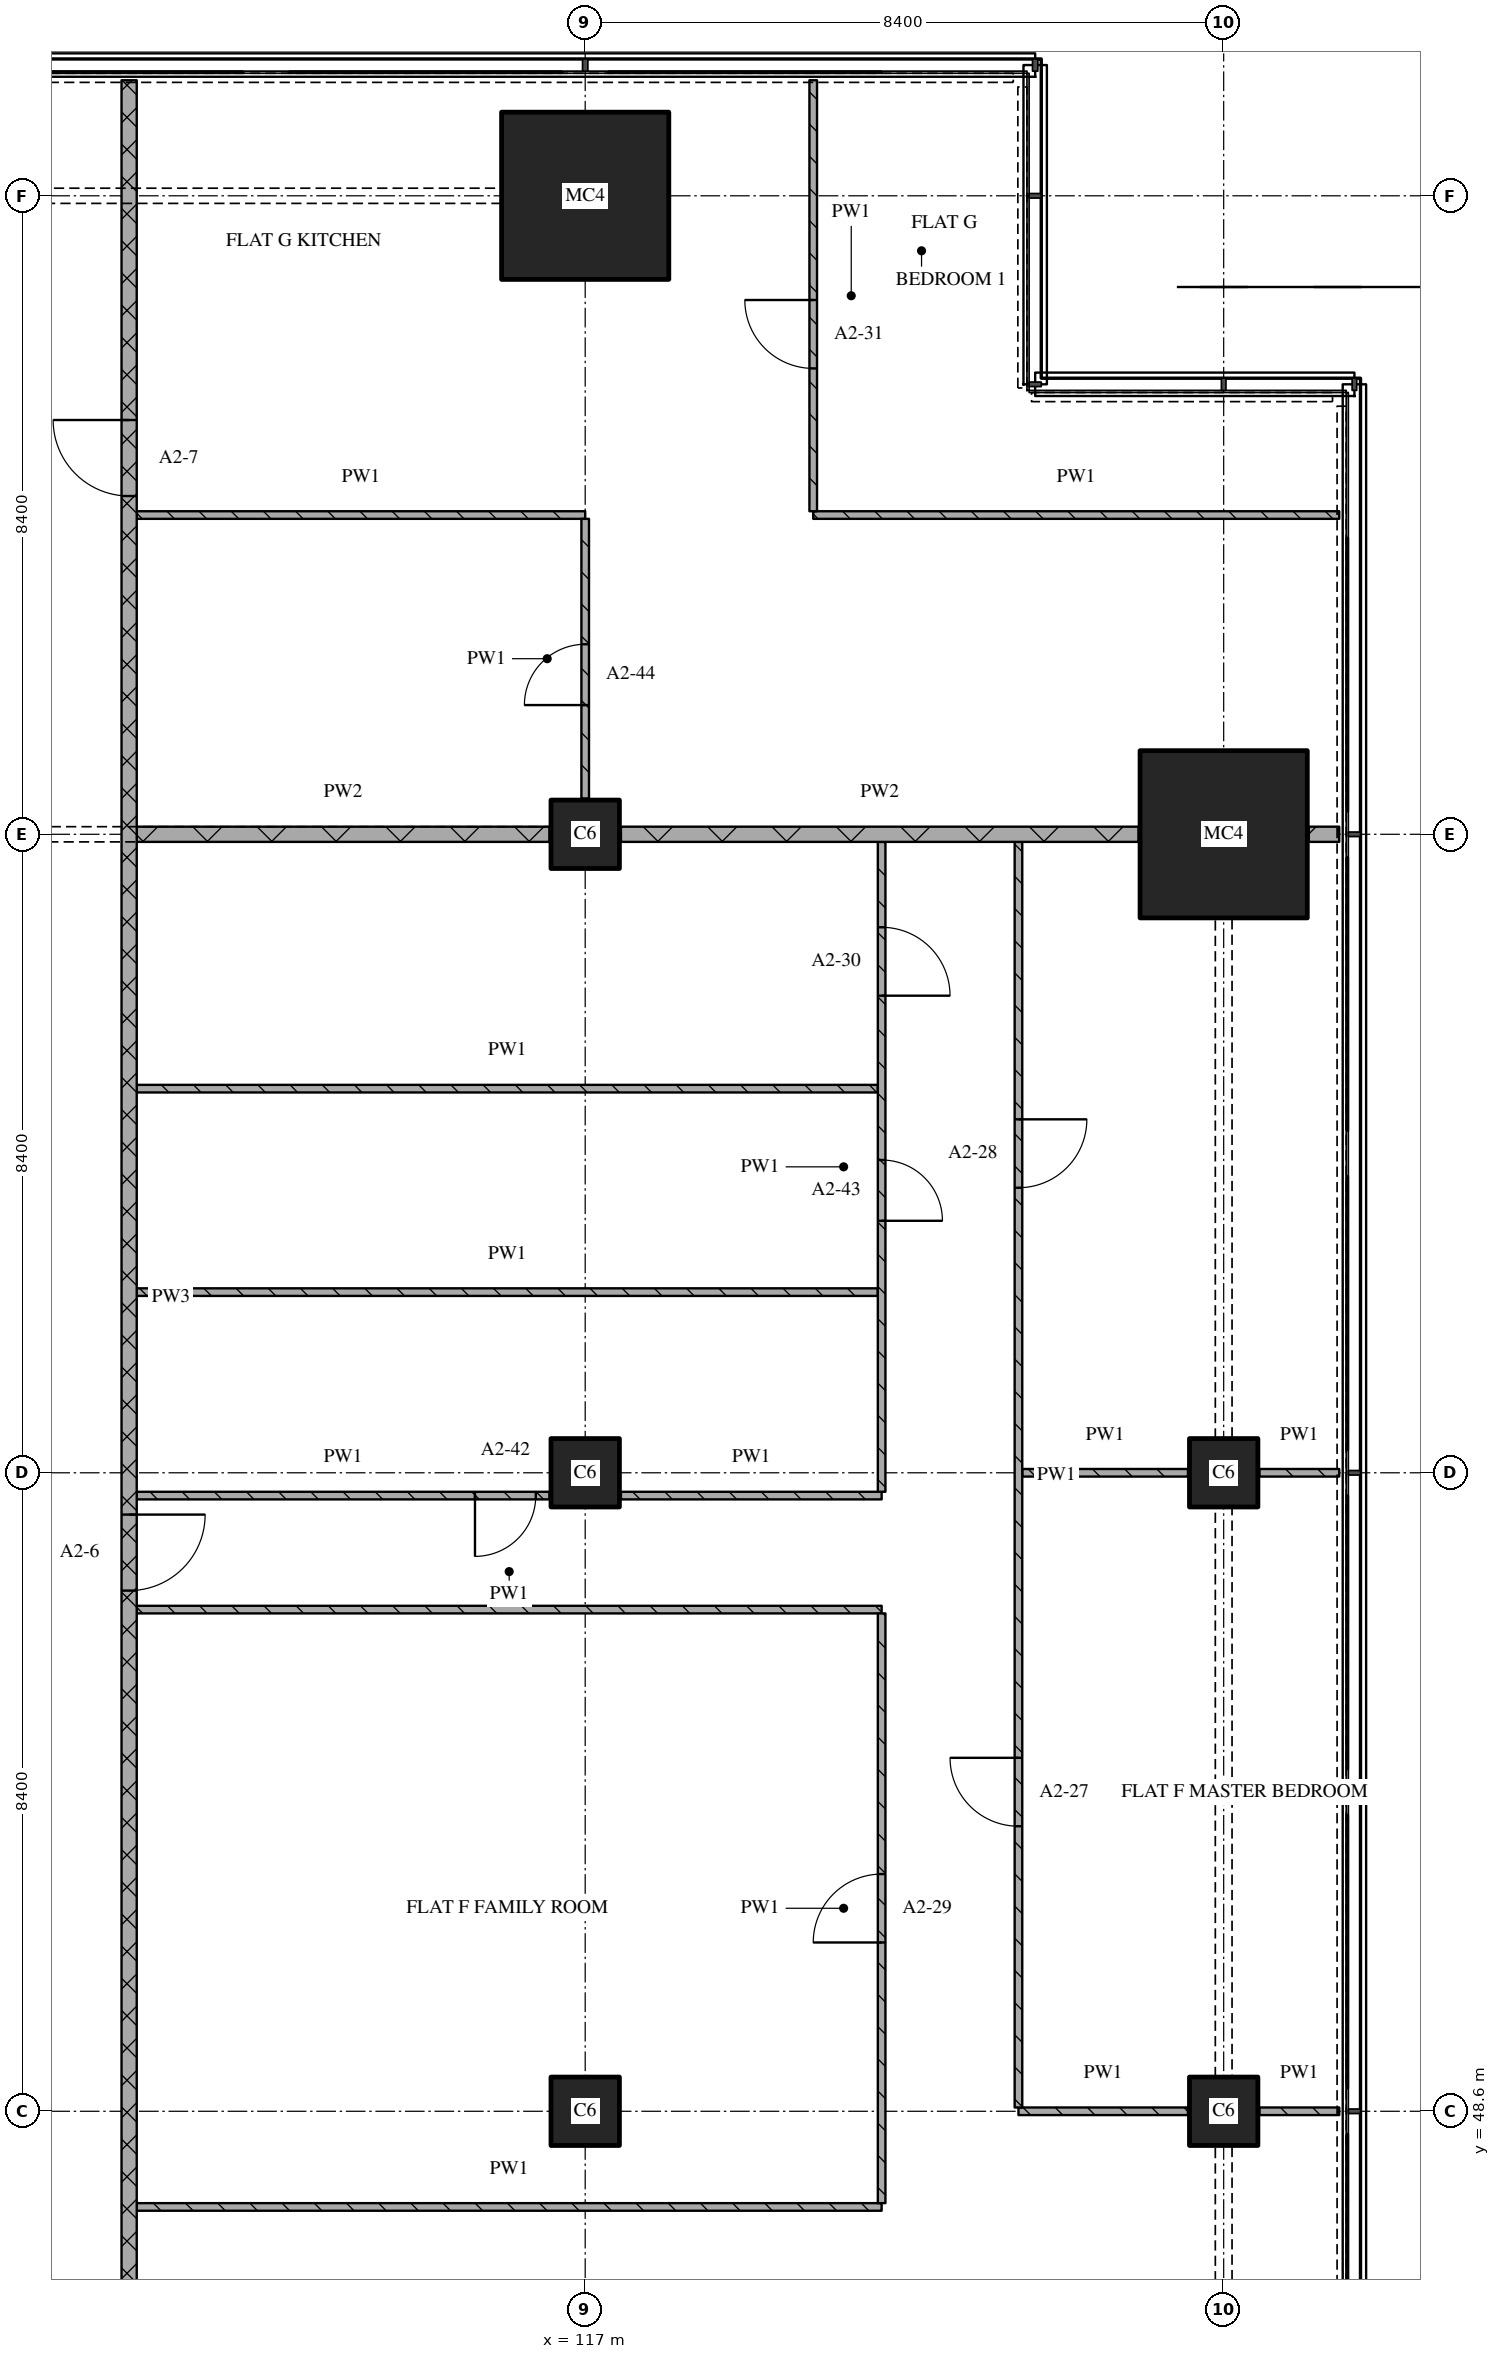
"""IFC4 building model, lengths in metres.
Left out: names, types, materials, properties, quantities, classifications, styles, units other than length and angle.
Written with IfcOpenShell. Run it as: python <this file> out.ifc"""

import sys

from ifc_helpers import new_model, si_unit, direction, frame, frame_2d, origin, origin_2d, place, context, subcontext, project, spatial, rectangle, extrude, element, fill, save


model = new_model("IFC4")
c1 = context("Model", 3, precision=1e-05, world=origin(), true_north=direction((0.0, 1.0)))
c2 = subcontext(c1, "Body", "Model", "MODEL_VIEW")
j1 = project(units=[si_unit("LENGTHUNIT", "METRE"), si_unit("PLANEANGLEUNIT", "RADIAN")], contexts=[c1])
p1 = place(None, origin())
s1 = spatial("IfcSite", under=j1, at=p1, CompositionType="ELEMENT")
p2 = place(p1, origin())
s2 = spatial("IfcBuilding", under=s1, at=p2, CompositionType="ELEMENT")
p3 = place(p2, frame((0.0, 0.0, 55.2)))
s3 = spatial("IfcBuildingStorey", under=s2, at=p3, CompositionType="ELEMENT", Elevation=55.2)
for number, where, z_axis, x_axis in (
    (1, (117.0, 48.6, 0.0), (0.0, 0.0, 1.0), (1.0, 0.0, 0.0)),
    (2, (117.0, 57.0, 0.0), (0.0, 0.0, 1.0), (1.0, 0.0, 0.0)),
    (3, (117.0, 65.4, 0.0), (0.0, 0.0, 1.0), (1.0, 0.0, 0.0)),
):
    element("IfcColumn", number, at=place(p3, frame(where, z_axis=z_axis, x_axis=x_axis)), inside=s3, PredefinedType="COLUMN", context=c2, shape_type="SweptSolid", body=[
        extrude(rectangle(XDim=0.9, YDim=0.9, at=origin_2d()), origin(), (0.0, 0.0, 1.0), 3.6),
    ])
p4 = place(p3, frame((117.0, 73.8, 0.0), z_axis=(0.0, 0.0, 1.0), x_axis=(1.0, 0.0, 0.0)))
e4 = element("IfcColumn", 4, at=p4, inside=s3, PredefinedType="COLUMN", context=c2, shape_type="SweptSolid", body=[
    extrude(rectangle(XDim=2.2, YDim=2.2, at=origin_2d()), origin(), (0.0, 0.0, 1.0), 3.6),
])
for number, where, z_axis, x_axis in (
    (5, (125.4, 48.6, 0.0), (0.0, 0.0, 1.0), (1.0, 0.0, 0.0)),
    (6, (125.4, 57.0, 0.0), (0.0, 0.0, 1.0), (1.0, 0.0, 0.0)),
):
    element("IfcColumn", number, at=place(p3, frame(where, z_axis=z_axis, x_axis=x_axis)), inside=s3, PredefinedType="COLUMN", context=c2, shape_type="SweptSolid", body=[
        extrude(rectangle(XDim=0.9, YDim=0.9, at=origin_2d()), origin(), (0.0, 0.0, 1.0), 3.6),
    ])
p5 = place(p3, frame((125.4, 65.4, 0.0), z_axis=(0.0, 0.0, 1.0), x_axis=(1.0, 0.0, 0.0)))
e7 = element("IfcColumn", 7, at=p5, inside=s3, PredefinedType="COLUMN", context=c2, shape_type="SweptSolid", body=[
    extrude(rectangle(XDim=2.2, YDim=2.2, at=origin_2d()), origin(), (0.0, 0.0, 1.0), 3.6),
])
p6 = place(p3, frame((111.1, 47.341, 0.0), z_axis=(0.0, 0.0, 1.0), x_axis=(1.0, 0.0, 0.0)))
e8 = element("IfcWall", 8, at=p6, inside=s3, PredefinedType="PARTITIONING", context=c2, shape_type="SweptSolid", body=[
    extrude(rectangle(XDim=9.8, YDim=0.1, at=frame_2d((4.9, 0.0))), origin(), (0.0, 0.0, 1.0), 3.32),
])
p7 = place(p3, frame((122.7, 48.6, 0.0), z_axis=(0.0, 0.0, 1.0), x_axis=(1.0, 0.0, 0.0)))
e9 = element("IfcWall", 9, at=p7, inside=s3, PredefinedType="PARTITIONING", context=c2, shape_type="SweptSolid", body=[
    extrude(rectangle(XDim=2.23, YDim=0.1, at=frame_2d((1.115, 0.0))), origin(), (0.0, 0.0, 1.0), 3.32),
])
p8 = place(p3, frame((125.87, 48.6, 0.0), z_axis=(0.0, 0.0, 1.0), x_axis=(1.0, 0.0, 0.0)))
e10 = element("IfcWall", 10, at=p8, inside=s3, PredefinedType="PARTITIONING", context=c2, shape_type="SweptSolid", body=[
    extrude(rectangle(XDim=1.05, YDim=0.1, at=frame_2d((0.525, 0.0))), origin(), (0.0, 0.0, 1.0), 3.32),
])
p9 = place(p3, frame((111.1, 55.2, 0.0), z_axis=(0.0, 0.0, 1.0), x_axis=(1.0, 0.0, 0.0)))
e11 = element("IfcWall", 11, at=p9, inside=s3, PredefinedType="PARTITIONING", context=c2, shape_type="SweptSolid", body=[
    extrude(rectangle(XDim=9.8, YDim=0.1, at=frame_2d((4.9, 0.0))), origin(), (0.0, 0.0, 1.0), 3.32),
])
p10 = place(p3, frame((111.1, 56.7, 0.0), z_axis=(0.0, 0.0, 1.0), x_axis=(1.0, 0.0, 0.0)))
e12 = element("IfcWall", 12, at=p10, inside=s3, PredefinedType="PARTITIONING", context=c2, shape_type="SweptSolid", body=[
    extrude(rectangle(XDim=5.43, YDim=0.1, at=frame_2d((2.715, 0.0))), origin(), (0.0, 0.0, 1.0), 3.32),
])
p11 = place(p10, frame((4.45, 0.0, 0.0)))
e13 = element("IfcOpeningElement", 13, at=p11, cuts=e12, PredefinedType="OPENING", context=c2, shape_type="SweptSolid", body=[
    extrude(rectangle(XDim=0.8, YDim=2.1, at=frame_2d((0.4, 1.05))), frame((0.0, 0.06, 0.0), z_axis=(0.0, -1.0, 0.0), x_axis=(1.0, 0.0, 0.0)), (0.0, 0.0, 1.0), 0.12),
])
p12 = place(p3, frame((117.47, 56.7, 0.0), z_axis=(0.0, 0.0, 1.0), x_axis=(1.0, 0.0, 0.0)))
e14 = element("IfcWall", 14, at=p12, inside=s3, PredefinedType="PARTITIONING", context=c2, shape_type="SweptSolid", body=[
    extrude(rectangle(XDim=3.43, YDim=0.1, at=frame_2d((1.715, 0.0))), origin(), (0.0, 0.0, 1.0), 3.32),
])
p13 = place(p3, frame((122.75, 57.0, 0.0), z_axis=(0.0, 0.0, 1.0), x_axis=(1.0, 0.0, 0.0)))
e15 = element("IfcWall", 15, at=p13, inside=s3, PredefinedType="PARTITIONING", context=c2, shape_type="SweptSolid", body=[
    extrude(rectangle(XDim=2.18, YDim=0.1, at=frame_2d((1.09, 0.0))), origin(), (0.0, 0.0, 1.0), 3.32),
])
p14 = place(p3, frame((125.87, 57.0, 0.0), z_axis=(0.0, 0.0, 1.0), x_axis=(1.0, 0.0, 0.0)))
e16 = element("IfcWall", 16, at=p14, inside=s3, PredefinedType="PARTITIONING", context=c2, shape_type="SweptSolid", body=[
    extrude(rectangle(XDim=1.05, YDim=0.1, at=frame_2d((0.525, 0.0))), origin(), (0.0, 0.0, 1.0), 3.32),
])
for number, where, z_axis, x_axis in (
    (17, (111.1, 59.377, 0.0), (0.0, 0.0, 1.0), (1.0, 0.0, 0.0)),
    (18, (111.1, 62.053, 0.0), (0.0, 0.0, 1.0), (1.0, 0.0, 0.0)),
):
    element("IfcWall", number, at=place(p3, frame(where, z_axis=z_axis, x_axis=x_axis)), inside=s3, PredefinedType="PARTITIONING", context=c2, shape_type="SweptSolid", body=[
        extrude(rectangle(XDim=9.75, YDim=0.1, at=frame_2d((4.875, 0.0))), origin(), (0.0, 0.0, 1.0), 3.32),
    ])
p15 = place(p3, frame((111.1, 65.4, 0.0), z_axis=(0.0, 0.0, 1.0), x_axis=(1.0, 0.0, 0.0)))
e19 = element("IfcWall", 19, at=p15, inside=s3, PredefinedType="PARTITIONING", context=c2, shape_type="SweptSolid", body=[
    extrude(rectangle(XDim=5.43, YDim=0.2, at=frame_2d((2.715, 0.0))), origin(), (0.0, 0.0, 1.0), 2.82),
])
p16 = place(p3, frame((117.47, 65.4, 0.0), z_axis=(0.0, 0.0, 1.0), x_axis=(1.0, 0.0, 0.0)))
e20 = element("IfcWall", 20, at=p16, inside=s3, PredefinedType="PARTITIONING", context=c2, shape_type="SweptSolid", body=[
    extrude(rectangle(XDim=6.81, YDim=0.2, at=frame_2d((3.405, 0.0))), origin(), (0.0, 0.0, 1.0), 3.32),
])
p17 = place(p3, frame((126.52, 65.4, 0.0), z_axis=(0.0, 0.0, 1.0), x_axis=(1.0, 0.0, 0.0)))
e21 = element("IfcWall", 21, at=p17, inside=s3, PredefinedType="PARTITIONING", context=c2, shape_type="SweptSolid", body=[
    extrude(rectangle(XDim=0.4, YDim=0.2, at=frame_2d((0.2, 0.0))), origin(), (0.0, 0.0, 1.0), 3.32),
])
p18 = place(p3, frame((111.1, 69.6, 0.0), z_axis=(0.0, 0.0, 1.0), x_axis=(1.0, 0.0, 0.0)))
e22 = element("IfcWall", 22, at=p18, inside=s3, PredefinedType="PARTITIONING", context=c2, shape_type="SweptSolid", body=[
    extrude(rectangle(XDim=5.9, YDim=0.1, at=frame_2d((2.95, 0.0))), origin(), (0.0, 0.0, 1.0), 3.32),
])
p19 = place(p3, frame((120.0, 69.6, 0.0), z_axis=(0.0, 0.0, 1.0), x_axis=(1.0, 0.0, 0.0)))
e23 = element("IfcWall", 23, at=p19, inside=s3, PredefinedType="PARTITIONING", context=c2, shape_type="SweptSolid", body=[
    extrude(rectangle(XDim=6.92, YDim=0.1, at=frame_2d((3.46, 0.0))), origin(), (0.0, 0.0, 1.0), 3.32),
])
p20 = place(p3, frame((111.0, 75.32, 0.0), z_axis=(0.0, 0.0, 1.0), x_axis=(0.0, -1.0, 0.0)))
e24 = element("IfcWall", 24, at=p20, inside=s3, PredefinedType="PARTITIONING", context=c2, shape_type="SweptSolid", body=[
    extrude(rectangle(XDim=32.02, YDim=0.2, at=frame_2d((16.01, 0.0))), origin(), (0.0, 0.0, 1.0), 3.32),
])
p21 = place(p20, frame((4.47, 0.0, 0.0)))
e25 = element("IfcOpeningElement", 25, at=p21, cuts=e24, PredefinedType="OPENING", context=c2, shape_type="SweptSolid", body=[
    extrude(rectangle(XDim=1.0, YDim=2.1, at=frame_2d((0.5, 1.05))), frame((0.0, 0.11, 0.0), z_axis=(0.0, -1.0, 0.0), x_axis=(1.0, 0.0, 0.0)), (0.0, 0.0, 1.0), 0.22),
])
p22 = place(p20, frame((18.87, 0.0, 0.0)))
e26 = element("IfcOpeningElement", 26, at=p22, cuts=e24, PredefinedType="OPENING", context=c2, shape_type="SweptSolid", body=[
    extrude(rectangle(XDim=1.0, YDim=2.1, at=frame_2d((0.5, 1.05))), frame((0.0, 0.11, 0.0), z_axis=(0.0, -1.0, 0.0), x_axis=(1.0, 0.0, 0.0)), (0.0, 0.0, 1.0), 0.22),
])
p23 = place(p3, frame((117.0, 65.87, 0.0), z_axis=(0.0, 0.0, 1.0), x_axis=(0.0, 1.0, 0.0)))
e27 = element("IfcWall", 27, at=p23, inside=s3, PredefinedType="PARTITIONING", context=c2, shape_type="SweptSolid", body=[
    extrude(rectangle(XDim=3.68, YDim=0.1, at=frame_2d((1.84, 0.0))), origin(), (0.0, 0.0, 1.0), 3.32),
])
p24 = place(p23, frame((1.23, 0.0, 0.0)))
e28 = element("IfcOpeningElement", 28, at=p24, cuts=e27, PredefinedType="OPENING", context=c2, shape_type="SweptSolid", body=[
    extrude(rectangle(XDim=0.8, YDim=2.1, at=frame_2d((0.4, 1.05))), frame((0.0, 0.06, 0.0), z_axis=(0.0, -1.0, 0.0), x_axis=(1.0, 0.0, 0.0)), (0.0, 0.0, 1.0), 0.12),
])
p25 = place(p3, frame((120.0, 75.32, 0.0), z_axis=(0.0, 0.0, 1.0), x_axis=(0.0, -1.0, 0.0)))
e29 = element("IfcWall", 29, at=p25, inside=s3, PredefinedType="PARTITIONING", context=c2, shape_type="SweptSolid", body=[
    extrude(rectangle(XDim=5.67, YDim=0.1, at=frame_2d((2.835, 0.0))), origin(), (0.0, 0.0, 1.0), 3.32),
])
p26 = place(p25, frame((2.891, 0.0, 0.0)))
e30 = element("IfcOpeningElement", 30, at=p26, cuts=e29, PredefinedType="OPENING", context=c2, shape_type="SweptSolid", body=[
    extrude(rectangle(XDim=0.9, YDim=2.1, at=frame_2d((0.45, 1.05))), frame((0.0, 0.06, 0.0), z_axis=(0.0, -1.0, 0.0), x_axis=(1.0, 0.0, 0.0)), (0.0, 0.0, 1.0), 0.12),
])
p27 = place(p3, frame((120.9, 47.391, 0.0), z_axis=(0.0, 0.0, 1.0), x_axis=(0.0, 1.0, 0.0)))
e31 = element("IfcWall", 31, at=p27, inside=s3, PredefinedType="PARTITIONING", context=c2, shape_type="SweptSolid", body=[
    extrude(rectangle(XDim=7.759, YDim=0.1, at=frame_2d((3.879, 0.0))), origin(), (0.0, 0.0, 1.0), 3.32),
])
p28 = place(p27, frame((3.429, 0.0, 0.0)))
e32 = element("IfcOpeningElement", 32, at=p28, cuts=e31, PredefinedType="OPENING", context=c2, shape_type="SweptSolid", body=[
    extrude(rectangle(XDim=0.9, YDim=2.1, at=frame_2d((0.45, 1.05))), frame((0.0, 0.06, 0.0), z_axis=(0.0, -1.0, 0.0), x_axis=(1.0, 0.0, 0.0)), (0.0, 0.0, 1.0), 0.12),
])
p29 = place(p3, frame((120.9, 56.75, 0.0), z_axis=(0.0, 0.0, 1.0), x_axis=(0.0, 1.0, 0.0)))
e33 = element("IfcWall", 33, at=p29, inside=s3, PredefinedType="PARTITIONING", context=c2, shape_type="SweptSolid", body=[
    extrude(rectangle(XDim=8.55, YDim=0.1, at=frame_2d((4.275, 0.0))), origin(), (0.0, 0.0, 1.0), 3.32),
])
p30 = place(p29, frame((3.565, 0.0, 0.0)))
e34 = element("IfcOpeningElement", 34, at=p30, cuts=e33, PredefinedType="OPENING", context=c2, shape_type="SweptSolid", body=[
    extrude(rectangle(XDim=0.8, YDim=2.1, at=frame_2d((0.4, 1.05))), frame((0.0, 0.06, 0.0), z_axis=(0.0, -1.0, 0.0), x_axis=(1.0, 0.0, 0.0)), (0.0, 0.0, 1.0), 0.12),
])
p31 = place(p29, frame((6.527, 0.0, 0.0)))
e35 = element("IfcOpeningElement", 35, at=p31, cuts=e33, PredefinedType="OPENING", context=c2, shape_type="SweptSolid", body=[
    extrude(rectangle(XDim=0.9, YDim=2.1, at=frame_2d((0.45, 1.05))), frame((0.0, 0.06, 0.0), z_axis=(0.0, -1.0, 0.0), x_axis=(1.0, 0.0, 0.0)), (0.0, 0.0, 1.0), 0.12),
])
p32 = place(p3, frame((122.7, 65.3, 0.0), z_axis=(0.0, 0.0, 1.0), x_axis=(0.0, -1.0, 0.0)))
e36 = element("IfcWall", 36, at=p32, inside=s3, PredefinedType="PARTITIONING", context=c2, shape_type="SweptSolid", body=[
    extrude(rectangle(XDim=16.65, YDim=0.1, at=frame_2d((8.325, 0.0))), origin(), (0.0, 0.0, 1.0), 3.32),
])
p33 = place(p32, frame((3.65, 0.0, 0.0)))
e37 = element("IfcOpeningElement", 37, at=p33, cuts=e36, PredefinedType="OPENING", context=c2, shape_type="SweptSolid", body=[
    extrude(rectangle(XDim=0.9, YDim=2.1, at=frame_2d((0.45, 1.05))), frame((0.0, 0.06, 0.0), z_axis=(0.0, -1.0, 0.0), x_axis=(1.0, 0.0, 0.0)), (0.0, 0.0, 1.0), 0.12),
])
p34 = place(p32, frame((12.05, 0.0, 0.0)))
e38 = element("IfcOpeningElement", 38, at=p34, cuts=e36, PredefinedType="OPENING", context=c2, shape_type="SweptSolid", body=[
    extrude(rectangle(XDim=0.9, YDim=2.1, at=frame_2d((0.45, 1.05))), frame((0.0, 0.06, 0.0), z_axis=(0.0, -1.0, 0.0), x_axis=(1.0, 0.0, 0.0)), (0.0, 0.0, 1.0), 0.12),
])
p35 = place(p11, origin())
e39 = element("IfcDoor", 39, at=p35, inside=s3, OperationType="SINGLE_SWING_RIGHT", PredefinedType="DOOR", context=c2, shape_type="SweptSolid", body=[
    extrude(rectangle(XDim=0.8, YDim=2.1, at=frame_2d((0.4, 1.05))), frame((0.0, 0.025, 0.0), z_axis=(0.0, -1.0, 0.0), x_axis=(1.0, 0.0, 0.0)), (0.0, 0.0, 1.0), 0.05),
])
fill(e13, e39)
p36 = place(p21, origin())
e40 = element("IfcDoor", 40, at=p36, inside=s3, OperationType="SINGLE_SWING_RIGHT", PredefinedType="DOOR", context=c2, shape_type="SweptSolid", body=[
    extrude(rectangle(XDim=1.0, YDim=2.1, at=frame_2d((0.5, 1.05))), frame((0.0, 0.025, 0.0), z_axis=(0.0, -1.0, 0.0), x_axis=(1.0, 0.0, 0.0)), (0.0, 0.0, 1.0), 0.05),
])
fill(e25, e40)
p37 = place(p22, origin())
e41 = element("IfcDoor", 41, at=p37, inside=s3, OperationType="SINGLE_SWING_LEFT", PredefinedType="DOOR", context=c2, shape_type="SweptSolid", body=[
    extrude(rectangle(XDim=1.0, YDim=2.1, at=frame_2d((0.5, 1.05))), frame((0.0, 0.025, 0.0), z_axis=(0.0, -1.0, 0.0), x_axis=(1.0, 0.0, 0.0)), (0.0, 0.0, 1.0), 0.05),
])
fill(e26, e41)
p38 = place(p24, origin())
e42 = element("IfcDoor", 42, at=p38, inside=s3, OperationType="SINGLE_SWING_LEFT", PredefinedType="DOOR", context=c2, shape_type="SweptSolid", body=[
    extrude(rectangle(XDim=0.8, YDim=2.1, at=frame_2d((0.4, 1.05))), frame((0.0, 0.025, 0.0), z_axis=(0.0, -1.0, 0.0), x_axis=(1.0, 0.0, 0.0)), (0.0, 0.0, 1.0), 0.05),
])
fill(e28, e42)
p39 = place(p26, origin())
e43 = element("IfcDoor", 43, at=p39, inside=s3, OperationType="SINGLE_SWING_RIGHT", PredefinedType="DOOR", context=c2, shape_type="SweptSolid", body=[
    extrude(rectangle(XDim=0.9, YDim=2.1, at=frame_2d((0.45, 1.05))), frame((0.0, 0.025, 0.0), z_axis=(0.0, -1.0, 0.0), x_axis=(1.0, 0.0, 0.0)), (0.0, 0.0, 1.0), 0.05),
])
fill(e30, e43)
p40 = place(p28, origin())
e44 = element("IfcDoor", 44, at=p40, inside=s3, OperationType="SINGLE_SWING_LEFT", PredefinedType="DOOR", context=c2, shape_type="SweptSolid", body=[
    extrude(rectangle(XDim=0.9, YDim=2.1, at=frame_2d((0.45, 1.05))), frame((0.0, 0.025, 0.0), z_axis=(0.0, -1.0, 0.0), x_axis=(1.0, 0.0, 0.0)), (0.0, 0.0, 1.0), 0.05),
])
fill(e32, e44)
p41 = place(p30, origin())
e45 = element("IfcDoor", 45, at=p41, inside=s3, OperationType="SINGLE_SWING_RIGHT", PredefinedType="DOOR", context=c2, shape_type="SweptSolid", body=[
    extrude(rectangle(XDim=0.8, YDim=2.1, at=frame_2d((0.4, 1.05))), frame((0.0, 0.025, 0.0), z_axis=(0.0, -1.0, 0.0), x_axis=(1.0, 0.0, 0.0)), (0.0, 0.0, 1.0), 0.05),
])
fill(e34, e45)
p42 = place(p31, origin())
e46 = element("IfcDoor", 46, at=p42, inside=s3, OperationType="SINGLE_SWING_RIGHT", PredefinedType="DOOR", context=c2, shape_type="SweptSolid", body=[
    extrude(rectangle(XDim=0.9, YDim=2.1, at=frame_2d((0.45, 1.05))), frame((0.0, 0.025, 0.0), z_axis=(0.0, -1.0, 0.0), x_axis=(1.0, 0.0, 0.0)), (0.0, 0.0, 1.0), 0.05),
])
fill(e35, e46)
p43 = place(p33, origin())
e47 = element("IfcDoor", 47, at=p43, inside=s3, OperationType="SINGLE_SWING_LEFT", PredefinedType="DOOR", context=c2, shape_type="SweptSolid", body=[
    extrude(rectangle(XDim=0.9, YDim=2.1, at=frame_2d((0.45, 1.05))), frame((0.0, 0.025, 0.0), z_axis=(0.0, -1.0, 0.0), x_axis=(1.0, 0.0, 0.0)), (0.0, 0.0, 1.0), 0.05),
])
fill(e37, e47)
p44 = place(p34, origin())
e48 = element("IfcDoor", 48, at=p44, inside=s3, OperationType="SINGLE_SWING_RIGHT", PredefinedType="DOOR", context=c2, shape_type="SweptSolid", body=[
    extrude(rectangle(XDim=0.9, YDim=2.1, at=frame_2d((0.45, 1.05))), frame((0.0, 0.025, 0.0), z_axis=(0.0, -1.0, 0.0), x_axis=(1.0, 0.0, 0.0)), (0.0, 0.0, 1.0), 0.05),
])
fill(e38, e48)
save(model, sys.argv[1])
